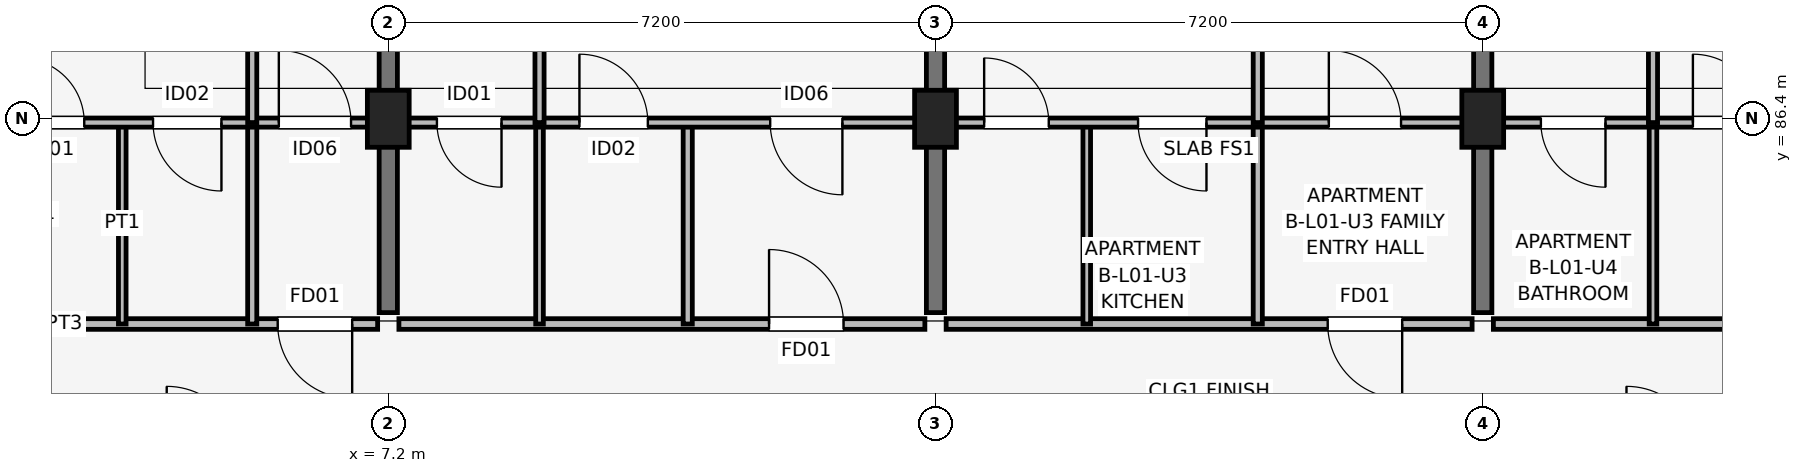
"""IFC4 building model, lengths in metres.
Left out: names, types, materials, properties, quantities, classifications, styles, units other than length and angle.
Written with IfcOpenShell. Run it as: python <this file> out.ifc"""

import sys

from ifc_helpers import new_model, si_unit, direction, frame, frame_2d, origin, origin_2d, place, context, subcontext, project, spatial, rectangle, extrude, element, fill, save


model = new_model("IFC4")
c1 = context("Model", 3, precision=1e-05, world=origin(), true_north=direction((0.0, 1.0)))
c2 = subcontext(c1, "Body", "Model", "MODEL_VIEW")
j1 = project(units=[si_unit("LENGTHUNIT", "METRE"), si_unit("PLANEANGLEUNIT", "RADIAN")], contexts=[c1])
p1 = place(None, origin())
s1 = spatial("IfcSite", under=j1, at=p1, CompositionType="ELEMENT")
p2 = place(p1, origin())
s2 = spatial("IfcBuilding", under=s1, at=p2, CompositionType="ELEMENT")
p3 = place(p2, frame((0.0, 0.0, 4.5)))
s3 = spatial("IfcBuildingStorey", under=s2, at=p3, CompositionType="ELEMENT", Elevation=4.5)
for number, where, z_axis, x_axis in (
    (1, (7.2, 86.4, 0.0), (0.0, 0.0, 1.0), (1.0, 0.0, 0.0)),
    (2, (14.4, 86.4, 0.0), (0.0, 0.0, 1.0), (1.0, 0.0, 0.0)),
    (3, (21.6, 86.4, 0.0), (0.0, 0.0, 1.0), (1.0, 0.0, 0.0)),
):
    element("IfcColumn", number, at=place(p3, frame(where, z_axis=z_axis, x_axis=x_axis)), inside=s3, PredefinedType="COLUMN", context=c2, shape_type="SweptSolid", body=[
        extrude(rectangle(XDim=0.55, YDim=0.75, at=origin_2d()), origin(), (0.0, 0.0, 1.0), 4.2),
    ])
for number, where, z_axis, x_axis in (
    (4, (7.2, 83.85, 0.0), (0.0, 0.0, 1.0), (0.0, 1.0, 0.0)),
    (5, (14.4, 83.85, 0.0), (0.0, 0.0, 1.0), (0.0, 1.0, 0.0)),
    (6, (21.6, 83.85, 0.0), (0.0, 0.0, 1.0), (0.0, 1.0, 0.0)),
):
    element("IfcWall", number, at=place(p3, frame(where, z_axis=z_axis, x_axis=x_axis)), inside=s3, PredefinedType="SHEAR", context=c2, shape_type="SweptSolid", body=[
        extrude(rectangle(XDim=9.4, YDim=0.24, at=frame_2d((4.7, 0.0))), origin(), (0.0, 0.0, 1.0), 4.2),
    ])
p4 = place(p3, frame((0.14, 83.7, 0.0), z_axis=(0.0, 0.0, 1.0), x_axis=(1.0, 0.0, 0.0)))
e7 = element("IfcWall", 7, at=p4, inside=s3, PredefinedType="PARTITIONING", context=c2, shape_type="SweptSolid", body=[
    extrude(rectangle(XDim=6.92, YDim=0.14, at=frame_2d((3.46, 0.0))), origin(), (0.0, 0.0, 1.0), 3.25),
])
p5 = place(p4, frame((6.585, 0.0, 0.0), z_axis=(0.0, 0.0, 1.0), x_axis=(-1.0, 0.0, 0.0)))
e8 = element("IfcOpeningElement", 8, at=p5, cuts=e7, PredefinedType="OPENING", context=c2, shape_type="SweptSolid", body=[
    extrude(rectangle(XDim=0.98, YDim=2.1, at=frame_2d((0.49, 1.05))), frame((0.0, 0.08, 0.0), z_axis=(0.0, -1.0, 0.0), x_axis=(1.0, 0.0, 0.0)), (0.0, 0.0, 1.0), 0.16),
])
p6 = place(p3, frame((3.7, 83.7, 0.0), z_axis=(0.0, 0.0, 1.0), x_axis=(0.0, 1.0, 0.0)))
e9 = element("IfcWall", 9, at=p6, inside=s3, PredefinedType="PARTITIONING", context=c2, shape_type="SweptSolid", body=[
    extrude(rectangle(XDim=2.65, YDim=0.1, at=frame_2d((1.325, 0.0))), origin(), (0.0, 0.0, 1.0), 3.25),
])
p7 = place(p3, frame((5.41, 83.7, 0.0), z_axis=(0.0, 0.0, 1.0), x_axis=(0.0, 1.0, 0.0)))
e10 = element("IfcWall", 10, at=p7, inside=s3, PredefinedType="PARTITIONING", context=c2, shape_type="SweptSolid", body=[
    extrude(rectangle(XDim=2.65, YDim=0.12, at=frame_2d((1.325, 0.0))), origin(), (0.0, 0.0, 1.0), 3.25),
])
p8 = place(p3, frame((0.14, 86.35, 0.0), z_axis=(0.0, 0.0, 1.0), x_axis=(1.0, 0.0, 0.0)))
e11 = element("IfcWall", 11, at=p8, inside=s3, PredefinedType="PARTITIONING", context=c2, shape_type="SweptSolid", body=[
    extrude(rectangle(XDim=6.92, YDim=0.12, at=frame_2d((3.46, 0.0))), origin(), (0.0, 0.0, 1.0), 3.25),
])
p9 = place(p8, frame((2.21, 0.0, 0.0)))
e12 = element("IfcOpeningElement", 12, at=p9, cuts=e11, PredefinedType="OPENING", context=c2, shape_type="SweptSolid", body=[
    extrude(rectangle(XDim=0.85, YDim=2.08, at=frame_2d((0.425, 1.04))), frame((0.0, 0.07, 0.0), z_axis=(0.0, -1.0, 0.0), x_axis=(1.0, 0.0, 0.0)), (0.0, 0.0, 1.0), 0.14),
])
p10 = place(p8, frame((4.865, 0.0, 0.0), z_axis=(0.0, 0.0, 1.0), x_axis=(-1.0, 0.0, 0.0)))
e13 = element("IfcOpeningElement", 13, at=p10, cuts=e11, PredefinedType="OPENING", context=c2, shape_type="SweptSolid", body=[
    extrude(rectangle(XDim=0.9, YDim=2.08, at=frame_2d((0.45, 1.04))), frame((0.0, 0.07, 0.0), z_axis=(0.0, -1.0, 0.0), x_axis=(1.0, 0.0, 0.0)), (0.0, 0.0, 1.0), 0.14),
])
p11 = place(p8, frame((5.62, 0.0, 0.0)))
e14 = element("IfcOpeningElement", 14, at=p11, cuts=e11, PredefinedType="OPENING", context=c2, shape_type="SweptSolid", body=[
    extrude(rectangle(XDim=0.95, YDim=2.08, at=frame_2d((0.475, 1.04))), frame((0.0, 0.07, 0.0), z_axis=(0.0, -1.0, 0.0), x_axis=(1.0, 0.0, 0.0)), (0.0, 0.0, 1.0), 0.14),
])
p12 = place(p3, frame((5.41, 86.35, 0.0), z_axis=(0.0, 0.0, 1.0), x_axis=(0.0, 1.0, 0.0)))
e15 = element("IfcWall", 15, at=p12, inside=s3, PredefinedType="PARTITIONING", context=c2, shape_type="SweptSolid", body=[
    extrude(rectangle(XDim=6.95, YDim=0.12, at=frame_2d((3.475, 0.0))), origin(), (0.0, 0.0, 1.0), 3.25),
])
p13 = place(p12, frame((3.925, 0.0, 0.0), z_axis=(0.0, 0.0, 1.0), x_axis=(-1.0, 0.0, 0.0)))
e16 = element("IfcOpeningElement", 16, at=p13, cuts=e15, PredefinedType="OPENING", context=c2, shape_type="SweptSolid", body=[
    extrude(rectangle(XDim=0.9, YDim=2.08, at=frame_2d((0.45, 1.04))), frame((0.0, 0.07, 0.0), z_axis=(0.0, -1.0, 0.0), x_axis=(1.0, 0.0, 0.0)), (0.0, 0.0, 1.0), 0.14),
])
p14 = place(p3, frame((7.34, 83.7, 0.0), z_axis=(0.0, 0.0, 1.0), x_axis=(1.0, 0.0, 0.0)))
e17 = element("IfcWall", 17, at=p14, inside=s3, PredefinedType="PARTITIONING", context=c2, shape_type="SweptSolid", body=[
    extrude(rectangle(XDim=6.92, YDim=0.14, at=frame_2d((3.46, 0.0))), origin(), (0.0, 0.0, 1.0), 3.25),
])
p15 = place(p14, frame((4.87, 0.0, 0.0)))
e18 = element("IfcOpeningElement", 18, at=p15, cuts=e17, PredefinedType="OPENING", context=c2, shape_type="SweptSolid", body=[
    extrude(rectangle(XDim=0.98, YDim=2.1, at=frame_2d((0.49, 1.05))), frame((0.0, 0.08, 0.0), z_axis=(0.0, -1.0, 0.0), x_axis=(1.0, 0.0, 0.0)), (0.0, 0.0, 1.0), 0.16),
])
p16 = place(p3, frame((9.19, 83.7, 0.0), z_axis=(0.0, 0.0, 1.0), x_axis=(0.0, 1.0, 0.0)))
e19 = element("IfcWall", 19, at=p16, inside=s3, PredefinedType="PARTITIONING", context=c2, shape_type="SweptSolid", body=[
    extrude(rectangle(XDim=2.65, YDim=0.1, at=frame_2d((1.325, 0.0))), origin(), (0.0, 0.0, 1.0), 3.25),
])
p17 = place(p3, frame((11.14, 83.7, 0.0), z_axis=(0.0, 0.0, 1.0), x_axis=(0.0, 1.0, 0.0)))
e20 = element("IfcWall", 20, at=p17, inside=s3, PredefinedType="PARTITIONING", context=c2, shape_type="SweptSolid", body=[
    extrude(rectangle(XDim=2.65, YDim=0.12, at=frame_2d((1.325, 0.0))), origin(), (0.0, 0.0, 1.0), 3.25),
])
p18 = place(p3, frame((7.34, 86.35, 0.0), z_axis=(0.0, 0.0, 1.0), x_axis=(1.0, 0.0, 0.0)))
e21 = element("IfcWall", 21, at=p18, inside=s3, PredefinedType="PARTITIONING", context=c2, shape_type="SweptSolid", body=[
    extrude(rectangle(XDim=6.92, YDim=0.12, at=frame_2d((3.46, 0.0))), origin(), (0.0, 0.0, 1.0), 3.25),
])
p19 = place(p18, frame((1.35, 0.0, 0.0), z_axis=(0.0, 0.0, 1.0), x_axis=(-1.0, 0.0, 0.0)))
e22 = element("IfcOpeningElement", 22, at=p19, cuts=e21, PredefinedType="OPENING", context=c2, shape_type="SweptSolid", body=[
    extrude(rectangle(XDim=0.85, YDim=2.08, at=frame_2d((0.425, 1.04))), frame((0.0, 0.07, 0.0), z_axis=(0.0, -1.0, 0.0), x_axis=(1.0, 0.0, 0.0)), (0.0, 0.0, 1.0), 0.14),
])
p20 = place(p18, frame((2.375, 0.0, 0.0)))
e23 = element("IfcOpeningElement", 23, at=p20, cuts=e21, PredefinedType="OPENING", context=c2, shape_type="SweptSolid", body=[
    extrude(rectangle(XDim=0.9, YDim=2.08, at=frame_2d((0.45, 1.04))), frame((0.0, 0.07, 0.0), z_axis=(0.0, -1.0, 0.0), x_axis=(1.0, 0.0, 0.0)), (0.0, 0.0, 1.0), 0.14),
])
p21 = place(p18, frame((5.835, 0.0, 0.0), z_axis=(0.0, 0.0, 1.0), x_axis=(-1.0, 0.0, 0.0)))
e24 = element("IfcOpeningElement", 24, at=p21, cuts=e21, PredefinedType="OPENING", context=c2, shape_type="SweptSolid", body=[
    extrude(rectangle(XDim=0.95, YDim=2.08, at=frame_2d((0.475, 1.04))), frame((0.0, 0.07, 0.0), z_axis=(0.0, -1.0, 0.0), x_axis=(1.0, 0.0, 0.0)), (0.0, 0.0, 1.0), 0.14),
])
p22 = place(p3, frame((9.19, 86.35, 0.0), z_axis=(0.0, 0.0, 1.0), x_axis=(0.0, 1.0, 0.0)))
e25 = element("IfcWall", 25, at=p22, inside=s3, PredefinedType="PARTITIONING", context=c2, shape_type="SweptSolid", body=[
    extrude(rectangle(XDim=6.95, YDim=0.12, at=frame_2d((3.475, 0.0))), origin(), (0.0, 0.0, 1.0), 3.25),
])
p23 = place(p22, frame((3.025, 0.0, 0.0)))
e26 = element("IfcOpeningElement", 26, at=p23, cuts=e25, PredefinedType="OPENING", context=c2, shape_type="SweptSolid", body=[
    extrude(rectangle(XDim=0.9, YDim=2.08, at=frame_2d((0.45, 1.04))), frame((0.0, 0.07, 0.0), z_axis=(0.0, -1.0, 0.0), x_axis=(1.0, 0.0, 0.0)), (0.0, 0.0, 1.0), 0.14),
])
p24 = place(p3, frame((14.54, 83.7, 0.0), z_axis=(0.0, 0.0, 1.0), x_axis=(1.0, 0.0, 0.0)))
e27 = element("IfcWall", 27, at=p24, inside=s3, PredefinedType="PARTITIONING", context=c2, shape_type="SweptSolid", body=[
    extrude(rectangle(XDim=6.92, YDim=0.14, at=frame_2d((3.46, 0.0))), origin(), (0.0, 0.0, 1.0), 3.25),
])
p25 = place(p24, frame((6.0, 0.0, 0.0), z_axis=(0.0, 0.0, 1.0), x_axis=(-1.0, 0.0, 0.0)))
e28 = element("IfcOpeningElement", 28, at=p25, cuts=e27, PredefinedType="OPENING", context=c2, shape_type="SweptSolid", body=[
    extrude(rectangle(XDim=0.98, YDim=2.1, at=frame_2d((0.49, 1.05))), frame((0.0, 0.08, 0.0), z_axis=(0.0, -1.0, 0.0), x_axis=(1.0, 0.0, 0.0)), (0.0, 0.0, 1.0), 0.16),
])
p26 = place(p3, frame((16.39, 83.7, 0.0), z_axis=(0.0, 0.0, 1.0), x_axis=(0.0, 1.0, 0.0)))
e29 = element("IfcWall", 29, at=p26, inside=s3, PredefinedType="PARTITIONING", context=c2, shape_type="SweptSolid", body=[
    extrude(rectangle(XDim=2.65, YDim=0.1, at=frame_2d((1.325, 0.0))), origin(), (0.0, 0.0, 1.0), 3.25),
])
p27 = place(p3, frame((18.64, 83.7, 0.0), z_axis=(0.0, 0.0, 1.0), x_axis=(0.0, 1.0, 0.0)))
e30 = element("IfcWall", 30, at=p27, inside=s3, PredefinedType="PARTITIONING", context=c2, shape_type="SweptSolid", body=[
    extrude(rectangle(XDim=2.65, YDim=0.12, at=frame_2d((1.325, 0.0))), origin(), (0.0, 0.0, 1.0), 3.25),
])
p28 = place(p3, frame((14.54, 86.35, 0.0), z_axis=(0.0, 0.0, 1.0), x_axis=(1.0, 0.0, 0.0)))
e31 = element("IfcWall", 31, at=p28, inside=s3, PredefinedType="PARTITIONING", context=c2, shape_type="SweptSolid", body=[
    extrude(rectangle(XDim=6.92, YDim=0.12, at=frame_2d((3.46, 0.0))), origin(), (0.0, 0.0, 1.0), 3.25),
])
p29 = place(p28, frame((0.5, 0.0, 0.0)))
e32 = element("IfcOpeningElement", 32, at=p29, cuts=e31, PredefinedType="OPENING", context=c2, shape_type="SweptSolid", body=[
    extrude(rectangle(XDim=0.85, YDim=2.08, at=frame_2d((0.425, 1.04))), frame((0.0, 0.07, 0.0), z_axis=(0.0, -1.0, 0.0), x_axis=(1.0, 0.0, 0.0)), (0.0, 0.0, 1.0), 0.14),
])
p30 = place(p28, frame((3.425, 0.0, 0.0), z_axis=(0.0, 0.0, 1.0), x_axis=(-1.0, 0.0, 0.0)))
e33 = element("IfcOpeningElement", 33, at=p30, cuts=e31, PredefinedType="OPENING", context=c2, shape_type="SweptSolid", body=[
    extrude(rectangle(XDim=0.9, YDim=2.08, at=frame_2d((0.45, 1.04))), frame((0.0, 0.07, 0.0), z_axis=(0.0, -1.0, 0.0), x_axis=(1.0, 0.0, 0.0)), (0.0, 0.0, 1.0), 0.14),
])
p31 = place(p28, frame((5.035, 0.0, 0.0)))
e34 = element("IfcOpeningElement", 34, at=p31, cuts=e31, PredefinedType="OPENING", context=c2, shape_type="SweptSolid", body=[
    extrude(rectangle(XDim=0.95, YDim=2.08, at=frame_2d((0.475, 1.04))), frame((0.0, 0.07, 0.0), z_axis=(0.0, -1.0, 0.0), x_axis=(1.0, 0.0, 0.0)), (0.0, 0.0, 1.0), 0.14),
])
p32 = place(p3, frame((18.64, 86.35, 0.0), z_axis=(0.0, 0.0, 1.0), x_axis=(0.0, 1.0, 0.0)))
e35 = element("IfcWall", 35, at=p32, inside=s3, PredefinedType="PARTITIONING", context=c2, shape_type="SweptSolid", body=[
    extrude(rectangle(XDim=6.95, YDim=0.12, at=frame_2d((3.475, 0.0))), origin(), (0.0, 0.0, 1.0), 3.25),
])
p33 = place(p32, frame((3.925, 0.0, 0.0), z_axis=(0.0, 0.0, 1.0), x_axis=(-1.0, 0.0, 0.0)))
e36 = element("IfcOpeningElement", 36, at=p33, cuts=e35, PredefinedType="OPENING", context=c2, shape_type="SweptSolid", body=[
    extrude(rectangle(XDim=0.9, YDim=2.08, at=frame_2d((0.45, 1.04))), frame((0.0, 0.07, 0.0), z_axis=(0.0, -1.0, 0.0), x_axis=(1.0, 0.0, 0.0)), (0.0, 0.0, 1.0), 0.14),
])
p34 = place(p3, frame((21.74, 83.7, 0.0), z_axis=(0.0, 0.0, 1.0), x_axis=(1.0, 0.0, 0.0)))
e37 = element("IfcWall", 37, at=p34, inside=s3, PredefinedType="PARTITIONING", context=c2, shape_type="SweptSolid", body=[
    extrude(rectangle(XDim=6.92, YDim=0.14, at=frame_2d((3.46, 0.0))), origin(), (0.0, 0.0, 1.0), 3.25),
])
p35 = place(p34, frame((4.995, 0.0, 0.0)))
e38 = element("IfcOpeningElement", 38, at=p35, cuts=e37, PredefinedType="OPENING", context=c2, shape_type="SweptSolid", body=[
    extrude(rectangle(XDim=0.98, YDim=2.1, at=frame_2d((0.49, 1.05))), frame((0.0, 0.08, 0.0), z_axis=(0.0, -1.0, 0.0), x_axis=(1.0, 0.0, 0.0)), (0.0, 0.0, 1.0), 0.16),
])
p36 = place(p3, frame((23.84, 83.7, 0.0), z_axis=(0.0, 0.0, 1.0), x_axis=(0.0, 1.0, 0.0)))
e39 = element("IfcWall", 39, at=p36, inside=s3, PredefinedType="PARTITIONING", context=c2, shape_type="SweptSolid", body=[
    extrude(rectangle(XDim=2.65, YDim=0.1, at=frame_2d((1.325, 0.0))), origin(), (0.0, 0.0, 1.0), 3.25),
])
p37 = place(p3, frame((21.74, 86.35, 0.0), z_axis=(0.0, 0.0, 1.0), x_axis=(1.0, 0.0, 0.0)))
e40 = element("IfcWall", 40, at=p37, inside=s3, PredefinedType="PARTITIONING", context=c2, shape_type="SweptSolid", body=[
    extrude(rectangle(XDim=6.92, YDim=0.12, at=frame_2d((3.46, 0.0))), origin(), (0.0, 0.0, 1.0), 3.25),
])
p38 = place(p37, frame((1.475, 0.0, 0.0), z_axis=(0.0, 0.0, 1.0), x_axis=(-1.0, 0.0, 0.0)))
e41 = element("IfcOpeningElement", 41, at=p38, cuts=e40, PredefinedType="OPENING", context=c2, shape_type="SweptSolid", body=[
    extrude(rectangle(XDim=0.85, YDim=2.08, at=frame_2d((0.425, 1.04))), frame((0.0, 0.07, 0.0), z_axis=(0.0, -1.0, 0.0), x_axis=(1.0, 0.0, 0.0)), (0.0, 0.0, 1.0), 0.14),
])
p39 = place(p37, frame((2.625, 0.0, 0.0)))
e42 = element("IfcOpeningElement", 42, at=p39, cuts=e40, PredefinedType="OPENING", context=c2, shape_type="SweptSolid", body=[
    extrude(rectangle(XDim=0.9, YDim=2.08, at=frame_2d((0.45, 1.04))), frame((0.0, 0.07, 0.0), z_axis=(0.0, -1.0, 0.0), x_axis=(1.0, 0.0, 0.0)), (0.0, 0.0, 1.0), 0.14),
])
p40 = place(p37, frame((5.96, 0.0, 0.0), z_axis=(0.0, 0.0, 1.0), x_axis=(-1.0, 0.0, 0.0)))
e43 = element("IfcOpeningElement", 43, at=p40, cuts=e40, PredefinedType="OPENING", context=c2, shape_type="SweptSolid", body=[
    extrude(rectangle(XDim=0.95, YDim=2.08, at=frame_2d((0.475, 1.04))), frame((0.0, 0.07, 0.0), z_axis=(0.0, -1.0, 0.0), x_axis=(1.0, 0.0, 0.0)), (0.0, 0.0, 1.0), 0.14),
])
p41 = place(p3, frame((23.84, 86.35, 0.0), z_axis=(0.0, 0.0, 1.0), x_axis=(0.0, 1.0, 0.0)))
e44 = element("IfcWall", 44, at=p41, inside=s3, PredefinedType="PARTITIONING", context=c2, shape_type="SweptSolid", body=[
    extrude(rectangle(XDim=6.95, YDim=0.12, at=frame_2d((3.475, 0.0))), origin(), (0.0, 0.0, 1.0), 3.25),
])
p42 = place(p41, frame((3.025, 0.0, 0.0)))
e45 = element("IfcOpeningElement", 45, at=p42, cuts=e44, PredefinedType="OPENING", context=c2, shape_type="SweptSolid", body=[
    extrude(rectangle(XDim=0.9, YDim=2.08, at=frame_2d((0.45, 1.04))), frame((0.0, 0.07, 0.0), z_axis=(0.0, -1.0, 0.0), x_axis=(1.0, 0.0, 0.0)), (0.0, 0.0, 1.0), 0.14),
])
p43 = place(p5, origin())
e46 = element("IfcDoor", 46, at=p43, inside=s3, OperationType="SINGLE_SWING_RIGHT", PredefinedType="DOOR", context=c2, shape_type="SweptSolid", body=[
    extrude(rectangle(XDim=0.98, YDim=2.1, at=frame_2d((0.49, 1.05))), frame((0.0, 0.025, 0.0), z_axis=(0.0, -1.0, 0.0), x_axis=(1.0, 0.0, 0.0)), (0.0, 0.0, 1.0), 0.05),
])
fill(e8, e46)
p44 = place(p9, origin())
e47 = element("IfcDoor", 47, at=p44, inside=s3, OperationType="SINGLE_SWING_LEFT", PredefinedType="DOOR", context=c2, shape_type="SweptSolid", body=[
    extrude(rectangle(XDim=0.85, YDim=2.08, at=frame_2d((0.425, 1.04))), frame((0.0, 0.025, 0.0), z_axis=(0.0, -1.0, 0.0), x_axis=(1.0, 0.0, 0.0)), (0.0, 0.0, 1.0), 0.05),
])
fill(e12, e47)
p45 = place(p10, origin())
e48 = element("IfcDoor", 48, at=p45, inside=s3, OperationType="SINGLE_SWING_RIGHT", PredefinedType="DOOR", context=c2, shape_type="SweptSolid", body=[
    extrude(rectangle(XDim=0.9, YDim=2.08, at=frame_2d((0.45, 1.04))), frame((0.0, 0.025, 0.0), z_axis=(0.0, -1.0, 0.0), x_axis=(1.0, 0.0, 0.0)), (0.0, 0.0, 1.0), 0.05),
])
fill(e13, e48)
p46 = place(p11, origin())
e49 = element("IfcDoor", 49, at=p46, inside=s3, OperationType="SINGLE_SWING_LEFT", PredefinedType="DOOR", context=c2, shape_type="SweptSolid", body=[
    extrude(rectangle(XDim=0.95, YDim=2.08, at=frame_2d((0.475, 1.04))), frame((0.0, 0.025, 0.0), z_axis=(0.0, -1.0, 0.0), x_axis=(1.0, 0.0, 0.0)), (0.0, 0.0, 1.0), 0.05),
])
fill(e14, e49)
p47 = place(p15, origin())
e50 = element("IfcDoor", 50, at=p47, inside=s3, OperationType="SINGLE_SWING_LEFT", PredefinedType="DOOR", context=c2, shape_type="SweptSolid", body=[
    extrude(rectangle(XDim=0.98, YDim=2.1, at=frame_2d((0.49, 1.05))), frame((0.0, 0.025, 0.0), z_axis=(0.0, -1.0, 0.0), x_axis=(1.0, 0.0, 0.0)), (0.0, 0.0, 1.0), 0.05),
])
fill(e18, e50)
p48 = place(p19, origin())
e51 = element("IfcDoor", 51, at=p48, inside=s3, OperationType="SINGLE_SWING_RIGHT", PredefinedType="DOOR", context=c2, shape_type="SweptSolid", body=[
    extrude(rectangle(XDim=0.85, YDim=2.08, at=frame_2d((0.425, 1.04))), frame((0.0, 0.025, 0.0), z_axis=(0.0, -1.0, 0.0), x_axis=(1.0, 0.0, 0.0)), (0.0, 0.0, 1.0), 0.05),
])
fill(e22, e51)
p49 = place(p20, origin())
e52 = element("IfcDoor", 52, at=p49, inside=s3, OperationType="SINGLE_SWING_LEFT", PredefinedType="DOOR", context=c2, shape_type="SweptSolid", body=[
    extrude(rectangle(XDim=0.9, YDim=2.08, at=frame_2d((0.45, 1.04))), frame((0.0, 0.025, 0.0), z_axis=(0.0, -1.0, 0.0), x_axis=(1.0, 0.0, 0.0)), (0.0, 0.0, 1.0), 0.05),
])
fill(e23, e52)
p50 = place(p21, origin())
e53 = element("IfcDoor", 53, at=p50, inside=s3, OperationType="SINGLE_SWING_RIGHT", PredefinedType="DOOR", context=c2, shape_type="SweptSolid", body=[
    extrude(rectangle(XDim=0.95, YDim=2.08, at=frame_2d((0.475, 1.04))), frame((0.0, 0.025, 0.0), z_axis=(0.0, -1.0, 0.0), x_axis=(1.0, 0.0, 0.0)), (0.0, 0.0, 1.0), 0.05),
])
fill(e24, e53)
p51 = place(p25, origin())
e54 = element("IfcDoor", 54, at=p51, inside=s3, OperationType="SINGLE_SWING_RIGHT", PredefinedType="DOOR", context=c2, shape_type="SweptSolid", body=[
    extrude(rectangle(XDim=0.98, YDim=2.1, at=frame_2d((0.49, 1.05))), frame((0.0, 0.025, 0.0), z_axis=(0.0, -1.0, 0.0), x_axis=(1.0, 0.0, 0.0)), (0.0, 0.0, 1.0), 0.05),
])
fill(e28, e54)
p52 = place(p29, origin())
e55 = element("IfcDoor", 55, at=p52, inside=s3, OperationType="SINGLE_SWING_LEFT", PredefinedType="DOOR", context=c2, shape_type="SweptSolid", body=[
    extrude(rectangle(XDim=0.85, YDim=2.08, at=frame_2d((0.425, 1.04))), frame((0.0, 0.025, 0.0), z_axis=(0.0, -1.0, 0.0), x_axis=(1.0, 0.0, 0.0)), (0.0, 0.0, 1.0), 0.05),
])
fill(e32, e55)
p53 = place(p30, origin())
e56 = element("IfcDoor", 56, at=p53, inside=s3, OperationType="SINGLE_SWING_RIGHT", PredefinedType="DOOR", context=c2, shape_type="SweptSolid", body=[
    extrude(rectangle(XDim=0.9, YDim=2.08, at=frame_2d((0.45, 1.04))), frame((0.0, 0.025, 0.0), z_axis=(0.0, -1.0, 0.0), x_axis=(1.0, 0.0, 0.0)), (0.0, 0.0, 1.0), 0.05),
])
fill(e33, e56)
p54 = place(p31, origin())
e57 = element("IfcDoor", 57, at=p54, inside=s3, OperationType="SINGLE_SWING_LEFT", PredefinedType="DOOR", context=c2, shape_type="SweptSolid", body=[
    extrude(rectangle(XDim=0.95, YDim=2.08, at=frame_2d((0.475, 1.04))), frame((0.0, 0.025, 0.0), z_axis=(0.0, -1.0, 0.0), x_axis=(1.0, 0.0, 0.0)), (0.0, 0.0, 1.0), 0.05),
])
fill(e34, e57)
p55 = place(p38, origin())
e58 = element("IfcDoor", 58, at=p55, inside=s3, OperationType="SINGLE_SWING_RIGHT", PredefinedType="DOOR", context=c2, shape_type="SweptSolid", body=[
    extrude(rectangle(XDim=0.85, YDim=2.08, at=frame_2d((0.425, 1.04))), frame((0.0, 0.025, 0.0), z_axis=(0.0, -1.0, 0.0), x_axis=(1.0, 0.0, 0.0)), (0.0, 0.0, 1.0), 0.05),
])
fill(e41, e58)
p56 = place(p39, origin())
e59 = element("IfcDoor", 59, at=p56, inside=s3, OperationType="SINGLE_SWING_LEFT", PredefinedType="DOOR", context=c2, shape_type="SweptSolid", body=[
    extrude(rectangle(XDim=0.9, YDim=2.08, at=frame_2d((0.45, 1.04))), frame((0.0, 0.025, 0.0), z_axis=(0.0, -1.0, 0.0), x_axis=(1.0, 0.0, 0.0)), (0.0, 0.0, 1.0), 0.05),
])
fill(e42, e59)
save(model, sys.argv[1])
